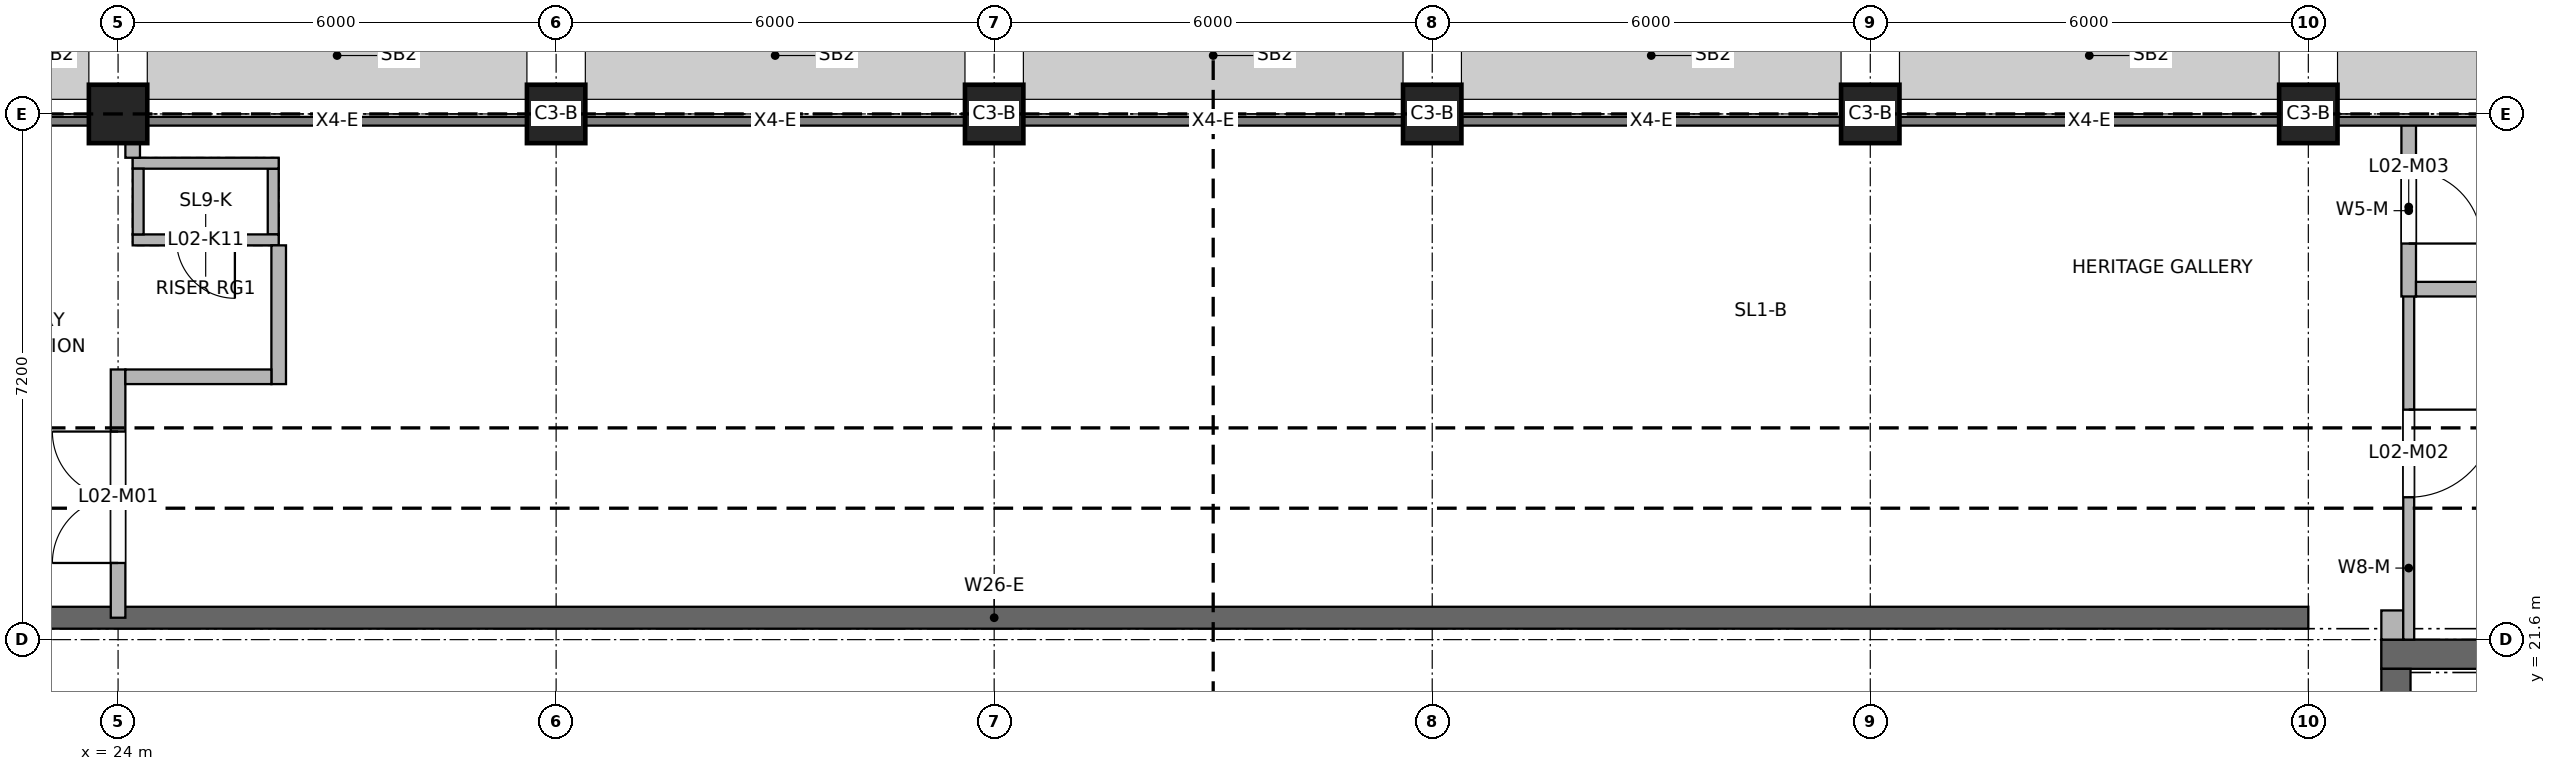
"""IFC4 building model, lengths in metres.
Left out: names, types, materials, properties, quantities, classifications, styles, units other than length and angle.
Written with IfcOpenShell. Run it as: python <this file> out.ifc"""

import sys

from ifc_helpers import new_model, si_unit, direction, frame, frame_2d, origin, origin_2d, place, context, subcontext, project, spatial, rectangle, extrude, element, fill, save


model = new_model("IFC4")
c1 = context("Model", 3, precision=1e-05, world=origin(), true_north=direction((0.0, 1.0)))
c2 = subcontext(c1, "Body", "Model", "MODEL_VIEW")
j1 = project(units=[si_unit("LENGTHUNIT", "METRE"), si_unit("PLANEANGLEUNIT", "RADIAN")], contexts=[c1])
p1 = place(None, origin())
s1 = spatial("IfcSite", under=j1, at=p1, CompositionType="ELEMENT")
p2 = place(p1, origin())
s2 = spatial("IfcBuilding", under=s1, at=p2, CompositionType="ELEMENT")
p3 = place(p2, frame((0.0, 0.0, 8.4)))
s3 = spatial("IfcBuildingStorey", under=s2, at=p3, CompositionType="ELEMENT", Elevation=8.4)
p4 = place(p3, frame((55.0, 21.4, 0.0), z_axis=(0.0, 0.0, 1.0), x_axis=(1.0, 0.0, 0.0)))
e1 = element("IfcWall", 1, at=p4, inside=s3, PredefinedType="SHEAR", context=c2, shape_type="SweptSolid", body=[
    extrude(rectangle(XDim=5.0, YDim=0.4, at=frame_2d((2.5, 0.0))), origin(), (0.0, 0.0, 1.0), 3.95),
])
p5 = place(p3, frame((55.2, 14.8, 0.0), z_axis=(0.0, 0.0, 1.0), x_axis=(0.0, 1.0, 0.0)))
e2 = element("IfcWall", 2, at=p5, inside=s3, PredefinedType="SHEAR", context=c2, shape_type="SweptSolid", body=[
    extrude(rectangle(XDim=6.4, YDim=0.4, at=frame_2d((3.2, 0.0))), origin(), (0.0, 0.0, 1.0), 3.95),
])
p6 = place(p3, frame((24.2, 27.075, 0.0), z_axis=(0.0, 0.0, 1.0), x_axis=(1.0, 0.0, 0.0)))
e3 = element("IfcWall", 3, at=p6, inside=s3, PredefinedType="SOLIDWALL", context=c2, shape_type="SweptSolid", body=[
    extrude(rectangle(XDim=2.0, YDim=0.15, at=frame_2d((1.0, 0.0))), origin(), (0.0, 0.0, 1.0), 4.2),
])
p7 = place(p6, frame((0.6, 0.0, 0.0)))
e4 = element("IfcOpeningElement", 4, at=p7, cuts=e3, PredefinedType="OPENING", context=c2, shape_type="SweptSolid", body=[
    extrude(rectangle(XDim=0.8, YDim=2.1, at=frame_2d((0.4, 1.05))), frame((0.0, 0.085, 0.0), z_axis=(0.0, -1.0, 0.0), x_axis=(1.0, 0.0, 0.0)), (0.0, 0.0, 1.0), 0.17),
])
p8 = place(p3, frame((24.2, 28.125, 0.0), z_axis=(0.0, 0.0, 1.0), x_axis=(1.0, 0.0, 0.0)))
e5 = element("IfcWall", 5, at=p8, inside=s3, PredefinedType="SOLIDWALL", context=c2, shape_type="SweptSolid", body=[
    extrude(rectangle(XDim=2.0, YDim=0.15, at=frame_2d((1.0, 0.0))), origin(), (0.0, 0.0, 1.0), 4.2),
])
for number, where, z_axis, x_axis in (
    (6, (24.275, 27.15, 0.0), (0.0, 0.0, 1.0), (0.0, 1.0, 0.0)),
    (7, (26.125, 27.15, 0.0), (0.0, 0.0, 1.0), (0.0, 1.0, 0.0)),
):
    element("IfcWall", number, at=place(p3, frame(where, z_axis=z_axis, x_axis=x_axis)), inside=s3, PredefinedType="SOLIDWALL", context=c2, shape_type="SweptSolid", body=[
        extrude(rectangle(XDim=0.9, YDim=0.15, at=frame_2d((0.45, 0.0))), origin(), (0.0, 0.0, 1.0), 4.2),
    ])
for number, where, z_axis, x_axis in (
    (8, (24.0, 28.8, 0.0), (0.0, 0.0, 1.0), (1.0, 0.0, 0.0)),
    (9, (30.0, 28.8, 0.0), (0.0, 0.0, 1.0), (1.0, 0.0, 0.0)),
    (10, (36.0, 28.8, 0.0), (0.0, 0.0, 1.0), (1.0, 0.0, 0.0)),
    (11, (42.0, 28.8, 0.0), (0.0, 0.0, 1.0), (1.0, 0.0, 0.0)),
    (12, (48.0, 28.8, 0.0), (0.0, 0.0, 1.0), (1.0, 0.0, 0.0)),
    (13, (54.0, 28.8, 0.0), (0.0, 0.0, 1.0), (1.0, 0.0, 0.0)),
):
    element("IfcColumn", number, at=place(p3, frame(where, z_axis=z_axis, x_axis=x_axis)), inside=s3, PredefinedType="COLUMN", context=c2, shape_type="SweptSolid", body=[
        extrude(rectangle(XDim=0.8, YDim=0.8, at=origin_2d()), origin(), (0.0, 0.0, 1.0), 4.0),
    ])
p9 = place(p3, frame((55.15, 21.6, 0.0), z_axis=(0.0, 0.0, 1.0), x_axis=(0.0, 1.0, 0.0)))
e14 = element("IfcWall", 14, at=p9, inside=s3, PredefinedType="SOLIDWALL", context=c2, shape_type="SweptSolid", body=[
    extrude(rectangle(XDim=0.4, YDim=0.3, at=frame_2d((0.2, 0.0))), origin(), (0.0, 0.0, 1.0), 3.95),
])
p10 = place(p3, frame((18.0, 21.9, 0.0), z_axis=(0.0, 0.0, 1.0), x_axis=(1.0, 0.0, 0.0)))
e15 = element("IfcWall", 15, at=p10, inside=s3, PredefinedType="SOLIDWALL", context=c2, shape_type="SweptSolid", body=[
    extrude(rectangle(XDim=36.0, YDim=0.3, at=frame_2d((18.0, 0.0))), origin(), (0.0, 0.0, 1.0), 4.0),
])
p11 = place(p3, frame((24.0, 21.9, 0.0), z_axis=(0.0, 0.0, 1.0), x_axis=(0.0, 1.0, 0.0)))
e16 = element("IfcWall", 16, at=p11, inside=s3, PredefinedType="PARTITIONING", context=c2, shape_type="SweptSolid", body=[
    extrude(rectangle(XDim=3.4, YDim=0.2, at=frame_2d((1.7, 0.0))), origin(), (0.0, 0.0, 1.0), 3.1),
])
p12 = place(p11, frame((0.75, 0.0, 0.0)))
e17 = element("IfcOpeningElement", 17, at=p12, cuts=e16, PredefinedType="OPENING", context=c2, shape_type="SweptSolid", body=[
    extrude(rectangle(XDim=1.8, YDim=2.4, at=frame_2d((0.9, 1.2))), frame((0.0, 0.11, 0.0), z_axis=(0.0, -1.0, 0.0), x_axis=(1.0, 0.0, 0.0)), (0.0, 0.0, 1.0), 0.22),
])
p13 = place(p3, frame((24.2, 28.2, 0.0), z_axis=(0.0, 0.0, 1.0), x_axis=(0.0, 1.0, 0.0)))
e18 = element("IfcWall", 18, at=p13, inside=s3, PredefinedType="PARTITIONING", context=c2, shape_type="SweptSolid", body=[
    extrude(rectangle(XDim=0.2, YDim=0.2, at=frame_2d((0.1, 0.0))), origin(), (0.0, 0.0, 1.0), 3.1),
])
p14 = place(p3, frame((26.2, 25.1, 0.0), z_axis=(0.0, 0.0, 1.0), x_axis=(0.0, 1.0, 0.0)))
e19 = element("IfcWall", 19, at=p14, inside=s3, PredefinedType="PARTITIONING", context=c2, shape_type="SweptSolid", body=[
    extrude(rectangle(XDim=1.9, YDim=0.2, at=frame_2d((0.95, 0.0))), origin(), (0.0, 0.0, 1.0), 4.0),
])
p15 = place(p3, frame((55.375, 21.6, 0.0), z_axis=(0.0, 0.0, 1.0), x_axis=(0.0, 1.0, 0.0)))
e20 = element("IfcWall", 20, at=p15, inside=s3, PredefinedType="PARTITIONING", context=c2, shape_type="SweptSolid", body=[
    extrude(rectangle(XDim=4.9, YDim=0.15, at=frame_2d((2.45, 0.0))), origin(), (0.0, 0.0, 1.0), 4.0),
])
p16 = place(p15, frame((1.95, 0.0, 0.0)))
e21 = element("IfcOpeningElement", 21, at=p16, cuts=e20, PredefinedType="OPENING", context=c2, shape_type="SweptSolid", body=[
    extrude(rectangle(XDim=1.2, YDim=2.1, at=frame_2d((0.6, 1.05))), frame((0.0, 0.085, 0.0), z_axis=(0.0, -1.0, 0.0), x_axis=(1.0, 0.0, 0.0)), (0.0, 0.0, 1.0), 0.17),
])
p17 = place(p3, frame((55.375, 26.3, 0.0), z_axis=(0.0, 0.0, 1.0), x_axis=(0.0, 1.0, 0.0)))
e22 = element("IfcWall", 22, at=p17, inside=s3, PredefinedType="PARTITIONING", context=c2, shape_type="SweptSolid", body=[
    extrude(rectangle(XDim=2.35, YDim=0.2, at=frame_2d((1.175, 0.0))), origin(), (0.0, 0.0, 1.0), 3.2),
])
p18 = place(p17, frame((0.725, 0.0, 0.0)))
e23 = element("IfcOpeningElement", 23, at=p18, cuts=e22, PredefinedType="OPENING", context=c2, shape_type="SweptSolid", body=[
    extrude(rectangle(XDim=1.0, YDim=2.1, at=frame_2d((0.5, 1.05))), frame((0.0, 0.11, 0.0), z_axis=(0.0, -1.0, 0.0), x_axis=(1.0, 0.0, 0.0)), (0.0, 0.0, 1.0), 0.22),
])
p19 = place(p3, frame((24.1, 25.2, 0.0), z_axis=(0.0, 0.0, 1.0), x_axis=(1.0, 0.0, 0.0)))
e24 = element("IfcWall", 24, at=p19, inside=s3, PredefinedType="PARTITIONING", context=c2, shape_type="SweptSolid", body=[
    extrude(rectangle(XDim=2.0, YDim=0.2, at=frame_2d((1.0, 0.0))), origin(), (0.0, 0.0, 1.0), 3.1),
])
p20 = place(p3, frame((55.475, 26.4, 0.0), z_axis=(0.0, 0.0, 1.0), x_axis=(1.0, 0.0, 0.0)))
e25 = element("IfcWall", 25, at=p20, inside=s3, PredefinedType="PARTITIONING", context=c2, shape_type="SweptSolid", body=[
    extrude(rectangle(XDim=16.375, YDim=0.2, at=frame_2d((8.188, 0.0))), origin(), (0.0, 0.0, 1.0), 3.25),
])
p21 = place(p7, frame((0.8, 0.0, 0.0), z_axis=(0.0, 0.0, 1.0), x_axis=(-1.0, 0.0, 0.0)))
e26 = element("IfcDoor", 26, at=p21, inside=s3, OperationType="SINGLE_SWING_LEFT", PredefinedType="DOOR", context=c2, shape_type="SweptSolid", body=[
    extrude(rectangle(XDim=0.8, YDim=2.1, at=frame_2d((0.4, 1.05))), frame((0.0, 0.025, 0.0), z_axis=(0.0, -1.0, 0.0), x_axis=(1.0, 0.0, 0.0)), (0.0, 0.0, 1.0), 0.05),
])
fill(e4, e26)
p22 = place(p12, origin())
e27 = element("IfcDoor", 27, at=p22, inside=s3, OperationType="DOUBLE_DOOR_SINGLE_SWING", PredefinedType="DOOR", context=c2, shape_type="SweptSolid", body=[
    extrude(rectangle(XDim=1.8, YDim=2.4, at=frame_2d((0.9, 1.2))), frame((0.0, 0.025, 0.0), z_axis=(0.0, -1.0, 0.0), x_axis=(1.0, 0.0, 0.0)), (0.0, 0.0, 1.0), 0.05),
])
fill(e17, e27)
p23 = place(p16, frame((1.2, 0.0, 0.0), z_axis=(0.0, 0.0, 1.0), x_axis=(-1.0, 0.0, 0.0)))
e28 = element("IfcDoor", 28, at=p23, inside=s3, OperationType="SINGLE_SWING_LEFT", PredefinedType="DOOR", context=c2, shape_type="SweptSolid", body=[
    extrude(rectangle(XDim=1.2, YDim=2.1, at=frame_2d((0.6, 1.05))), frame((0.0, 0.025, 0.0), z_axis=(0.0, -1.0, 0.0), x_axis=(1.0, 0.0, 0.0)), (0.0, 0.0, 1.0), 0.05),
])
fill(e21, e28)
p24 = place(p18, frame((1.0, 0.0, 0.0), z_axis=(0.0, 0.0, 1.0), x_axis=(-1.0, 0.0, 0.0)))
e29 = element("IfcDoor", 29, at=p24, inside=s3, OperationType="SINGLE_SWING_RIGHT", PredefinedType="DOOR", context=c2, shape_type="SweptSolid", body=[
    extrude(rectangle(XDim=1.0, YDim=2.1, at=frame_2d((0.5, 1.05))), frame((0.0, 0.025, 0.0), z_axis=(0.0, -1.0, 0.0), x_axis=(1.0, 0.0, 0.0)), (0.0, 0.0, 1.0), 0.05),
])
fill(e23, e29)
save(model, sys.argv[1])
